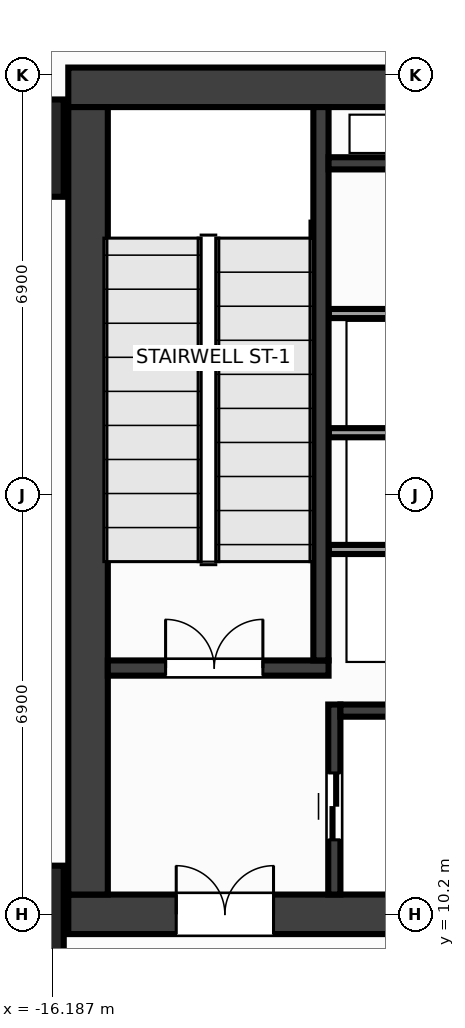
"""IFC4 building model, lengths in metres.
Left out: names, types, materials, properties, quantities, classifications, styles, units other than length and angle.
Written with IfcOpenShell. Run it as: python <this file> out.ifc"""

import sys

from ifc_helpers import new_model, si_unit, direction, frame, frame_2d, origin, origin_2d, place, context, subcontext, project, spatial, rectangle, extrude, source, transform, mapped, element, fill, save


model = new_model("IFC4")
c1 = context("Model", 3, precision=1e-05, world=origin(), true_north=direction((0.0, 1.0)))
c2 = subcontext(c1, "Body", "Model", "MODEL_VIEW")
j1 = project(units=[si_unit("LENGTHUNIT", "METRE"), si_unit("PLANEANGLEUNIT", "RADIAN")], contexts=[c1])
p1 = place(None, origin())
s1 = spatial("IfcSite", under=j1, at=p1, CompositionType="ELEMENT")
p2 = place(p1, origin())
s2 = spatial("IfcBuilding", under=s1, at=p2, CompositionType="ELEMENT")
p3 = place(p2, frame((0.0, 0.0, 189.2)))
s3 = spatial("IfcBuildingStorey", under=s2, at=p3, CompositionType="ELEMENT", Elevation=189.2)
m1 = source(origin(), c2, "Body", "SweptSolid", [
    extrude(rectangle(XDim=31.85, YDim=0.65, at=frame_2d((15.925, 0.0))), origin(), (0.0, 0.0, 1.0), 7.2),
])
p4 = place(p3, frame((-15.925, 23.8, 0.0), z_axis=(0.0, 0.0, 1.0), x_axis=(1.0, 0.0, 0.0)))
e1 = element("IfcWall", 1, at=p4, inside=s3, PredefinedType="SHEAR", context=c2, shape_type="MappedRepresentation", body=[
    mapped(m1, transform((0.0, 0.0, 0.0), x_axis=(1.0, 0.0, 0.0), y_axis=(0.0, 1.0, 0.0), z_axis=(0.0, 0.0, 1.0), scale=1.0)),
])
p5 = place(p3, frame((-15.925, 10.2, 0.0), z_axis=(0.0, 0.0, 1.0), x_axis=(1.0, 0.0, 0.0)))
e2 = element("IfcWall", 2, at=p5, inside=s3, PredefinedType="SHEAR", context=c2, shape_type="MappedRepresentation", body=[
    mapped(m1, transform((0.0, 0.0, 0.0), x_axis=(1.0, 0.0, 0.0), y_axis=(0.0, 1.0, 0.0), z_axis=(0.0, 0.0, 1.0), scale=1.0)),
])
p6 = place(p5, frame((1.775, 0.0, 0.0)))
e3 = element("IfcOpeningElement", 3, at=p6, cuts=e2, PredefinedType="OPENING", context=c2, shape_type="SweptSolid", body=[
    extrude(rectangle(XDim=1.6, YDim=2.15, at=frame_2d((0.8, 1.075))), frame((0.0, 0.337, 0.0), z_axis=(0.0, -1.0, 0.0), x_axis=(1.0, 0.0, 0.0)), (0.0, 0.0, 1.0), 0.674),
])
p7 = place(p5, frame((28.475, 0.0, 0.0)))
e4 = element("IfcOpeningElement", 4, at=p7, cuts=e2, PredefinedType="OPENING", context=c2, shape_type="SweptSolid", body=[
    extrude(rectangle(XDim=1.6, YDim=2.15, at=frame_2d((0.8, 1.075))), frame((0.0, 0.337, 0.0), z_axis=(0.0, -1.0, 0.0), x_axis=(1.0, 0.0, 0.0)), (0.0, 0.0, 1.0), 0.674),
])
p8 = place(p5, frame((15.175, 0.0, 0.0)))
e5 = element("IfcOpeningElement", 5, at=p8, cuts=e2, PredefinedType="OPENING", context=c2, shape_type="SweptSolid", body=[
    extrude(rectangle(XDim=1.5, YDim=2.2, at=frame_2d((0.75, 1.1))), frame((0.0, 0.337, 0.0), z_axis=(0.0, -1.0, 0.0), x_axis=(1.0, 0.0, 0.0)), (0.0, 0.0, 1.0), 0.674),
])
m2 = source(origin(), c2, "Body", "SweptSolid", [
    extrude(rectangle(XDim=12.95, YDim=0.65, at=frame_2d((6.475, 0.0))), origin(), (0.0, 0.0, 1.0), 7.2),
])
p9 = place(p3, frame((-15.6, 10.525, 0.0), z_axis=(0.0, 0.0, 1.0), x_axis=(0.0, 1.0, 0.0)))
e6 = element("IfcWall", 6, at=p9, inside=s3, PredefinedType="SHEAR", context=c2, shape_type="MappedRepresentation", body=[
    mapped(m2, transform((0.0, 0.0, 0.0), x_axis=(1.0, 0.0, 0.0), y_axis=(0.0, 1.0, 0.0), z_axis=(0.0, 0.0, 1.0), scale=1.0)),
])
m3 = source(origin(), c2, "Body", "SweptSolid", [
    extrude(rectangle(XDim=3.63, YDim=0.25, at=frame_2d((1.815, 0.0))), origin(), (0.0, 0.0, 1.0), 7.2),
])
p10 = place(p3, frame((-15.275, 14.25, 0.0), z_axis=(0.0, 0.0, 1.0), x_axis=(1.0, 0.0, 0.0)))
e7 = element("IfcWall", 7, at=p10, inside=s3, PredefinedType="SHEAR", context=c2, shape_type="MappedRepresentation", body=[
    mapped(m3, transform((0.0, 0.0, 0.0), x_axis=(1.0, 0.0, 0.0), y_axis=(0.0, 1.0, 0.0), z_axis=(0.0, 0.0, 1.0), scale=1.0)),
])
p11 = place(p10, frame((0.95, 0.0, 0.0)))
e8 = element("IfcOpeningElement", 8, at=p11, cuts=e7, PredefinedType="OPENING", context=c2, shape_type="SweptSolid", body=[
    extrude(rectangle(XDim=1.6, YDim=2.15, at=frame_2d((0.8, 1.075))), frame((0.0, 0.137, 0.0), z_axis=(0.0, -1.0, 0.0), x_axis=(1.0, 0.0, 0.0)), (0.0, 0.0, 1.0), 0.274),
])
m4 = source(origin(), c2, "Body", "SweptSolid", [
    extrude(rectangle(XDim=9.1, YDim=0.25, at=frame_2d((4.55, 0.0))), origin(), (0.0, 0.0, 1.0), 7.2),
])
p12 = place(p3, frame((-11.77, 14.375, 0.0), z_axis=(0.0, 0.0, 1.0), x_axis=(0.0, 1.0, 0.0)))
e9 = element("IfcWall", 9, at=p12, inside=s3, PredefinedType="SHEAR", context=c2, shape_type="MappedRepresentation", body=[
    mapped(m4, transform((0.0, 0.0, 0.0), x_axis=(1.0, 0.0, 0.0), y_axis=(0.0, 1.0, 0.0), z_axis=(0.0, 0.0, 1.0), scale=1.0)),
])
m5 = source(origin(), c2, "Body", "SweptSolid", [
    extrude(rectangle(XDim=3.125, YDim=0.2, at=frame_2d((1.562, 0.0))), origin(), (0.0, 0.0, 1.0), 7.2),
])
p13 = place(p3, frame((-11.55, 10.525, 0.0), z_axis=(0.0, 0.0, 1.0), x_axis=(0.0, 1.0, 0.0)))
e10 = element("IfcWall", 10, at=p13, inside=s3, PredefinedType="SHEAR", context=c2, shape_type="MappedRepresentation", body=[
    mapped(m5, transform((0.0, 0.0, 0.0), x_axis=(1.0, 0.0, 0.0), y_axis=(0.0, 1.0, 0.0), z_axis=(0.0, 0.0, 1.0), scale=1.0)),
])
p14 = place(p13, frame((0.9, 0.0, 0.0)))
e11 = element("IfcOpeningElement", 11, at=p14, cuts=e10, PredefinedType="OPENING", context=c2, shape_type="SweptSolid", body=[
    extrude(rectangle(XDim=1.1, YDim=2.15, at=frame_2d((0.55, 1.075))), frame((0.0, 0.112, 0.0), z_axis=(0.0, -1.0, 0.0), x_axis=(1.0, 0.0, 0.0)), (0.0, 0.0, 1.0), 0.224),
])
m6 = source(origin(), c2, "Body", "SweptSolid", [
    extrude(rectangle(XDim=2.825, YDim=0.2, at=frame_2d((1.413, 0.0))), origin(), (0.0, 0.0, 1.0), 7.2),
])
p15 = place(p3, frame((-11.45, 13.55, 0.0), z_axis=(0.0, 0.0, 1.0), x_axis=(1.0, 0.0, 0.0)))
e12 = element("IfcWall", 12, at=p15, inside=s3, PredefinedType="SHEAR", context=c2, shape_type="MappedRepresentation", body=[
    mapped(m6, transform((0.0, 0.0, 0.0), x_axis=(1.0, 0.0, 0.0), y_axis=(0.0, 1.0, 0.0), z_axis=(0.0, 0.0, 1.0), scale=1.0)),
])
m7 = source(origin(), c2, "Body", "SweptSolid", [
    extrude(rectangle(XDim=3.02, YDim=0.2, at=frame_2d((1.51, 0.0))), origin(), (0.0, 0.0, 1.0), 7.2),
])
p16 = place(p3, frame((-11.645, 22.55, 0.0), z_axis=(0.0, 0.0, 1.0), x_axis=(1.0, 0.0, 0.0)))
e13 = element("IfcWall", 13, at=p16, inside=s3, PredefinedType="SHEAR", context=c2, shape_type="MappedRepresentation", body=[
    mapped(m7, transform((0.0, 0.0, 0.0), x_axis=(1.0, 0.0, 0.0), y_axis=(0.0, 1.0, 0.0), z_axis=(0.0, 0.0, 1.0), scale=1.0)),
])
m8 = source(origin(), c2, "Body", "SweptSolid", [
    extrude(rectangle(XDim=1.6, YDim=1.6, at=origin_2d()), origin(), (0.0, 0.0, 1.0), 7.2),
])
for number, where, z_axis, x_axis in (
    (14, (-16.8, 10.2, 0.0), (0.0, 0.0, 1.0), (1.0, 0.0, 0.0)),
    (15, (-16.8, 22.8, 0.0), (0.0, 0.0, 1.0), (1.0, 0.0, 0.0)),
):
    element("IfcColumn", number, at=place(p3, frame(where, z_axis=z_axis, x_axis=x_axis)), inside=s3, PredefinedType="COLUMN", context=c2, shape_type="MappedRepresentation", body=[
        mapped(m8, transform((0.0, 0.0, 0.0), x_axis=(1.0, 0.0, 0.0), y_axis=(0.0, 1.0, 0.0), z_axis=(0.0, 0.0, 1.0), scale=1.0)),
    ])
m9 = source(origin(), c2, "Body", "SweptSolid", [
    extrude(rectangle(XDim=3.01, YDim=0.15, at=frame_2d((1.505, 0.0))), origin(), (0.0, 0.0, 1.0), 6.9),
])
for number, where, z_axis, x_axis in (
    (16, (-11.64, 16.2, 0.0), (0.0, 0.0, 1.0), (1.0, 0.0, 0.0)),
    (17, (-11.64, 18.12, 0.0), (0.0, 0.0, 1.0), (1.0, 0.0, 0.0)),
    (18, (-11.64, 20.08, 0.0), (0.0, 0.0, 1.0), (1.0, 0.0, 0.0)),
):
    element("IfcWall", number, at=place(p3, frame(where, z_axis=z_axis, x_axis=x_axis)), inside=s3, PredefinedType="PARTITIONING", context=c2, shape_type="MappedRepresentation", body=[
        mapped(m9, transform((0.0, 0.0, 0.0), x_axis=(1.0, 0.0, 0.0), y_axis=(0.0, 1.0, 0.0), z_axis=(0.0, 0.0, 1.0), scale=1.0)),
    ])
m10 = source(origin(), c2, "Body", "SweptSolid", [
    extrude(rectangle(XDim=1.6, YDim=2.15, at=frame_2d((0.8, 1.075))), frame((0.0, 0.025, 0.0), z_axis=(0.0, -1.0, 0.0), x_axis=(1.0, 0.0, 0.0)), (0.0, 0.0, 1.0), 0.05),
])
p17 = place(p11, origin())
e19 = element("IfcDoor", 19, at=p17, inside=s3, OperationType="DOUBLE_DOOR_SINGLE_SWING", PredefinedType="DOOR", context=c2, shape_type="MappedRepresentation", body=[
    mapped(m10, transform((0.0, 0.0, 0.0), x_axis=(1.0, 0.0, 0.0), y_axis=(0.0, 1.0, 0.0), z_axis=(0.0, 0.0, 1.0), scale=1.0)),
])
fill(e8, e19)
p18 = place(p6, origin())
e20 = element("IfcDoor", 20, at=p18, inside=s3, OperationType="DOUBLE_DOOR_SINGLE_SWING", PredefinedType="DOOR", context=c2, shape_type="MappedRepresentation", body=[
    mapped(m10, transform((0.0, 0.0, 0.0), x_axis=(1.0, 0.0, 0.0), y_axis=(0.0, 1.0, 0.0), z_axis=(0.0, 0.0, 1.0), scale=1.0)),
])
fill(e3, e20)
m11 = source(origin(), c2, "Body", "SweptSolid", [
    extrude(rectangle(XDim=1.1, YDim=2.15, at=frame_2d((0.55, 1.075))), frame((0.0, 0.025, 0.0), z_axis=(0.0, -1.0, 0.0), x_axis=(1.0, 0.0, 0.0)), (0.0, 0.0, 1.0), 0.05),
])
p19 = place(p14, origin())
e21 = element("IfcDoor", 21, at=p19, inside=s3, OperationType="DOUBLE_DOOR_SLIDING", PredefinedType="DOOR", context=c2, shape_type="MappedRepresentation", body=[
    mapped(m11, transform((0.0, 0.0, 0.0), x_axis=(1.0, 0.0, 0.0), y_axis=(0.0, 1.0, 0.0), z_axis=(0.0, 0.0, 1.0), scale=1.0)),
])
fill(e11, e21)
save(model, sys.argv[1])
